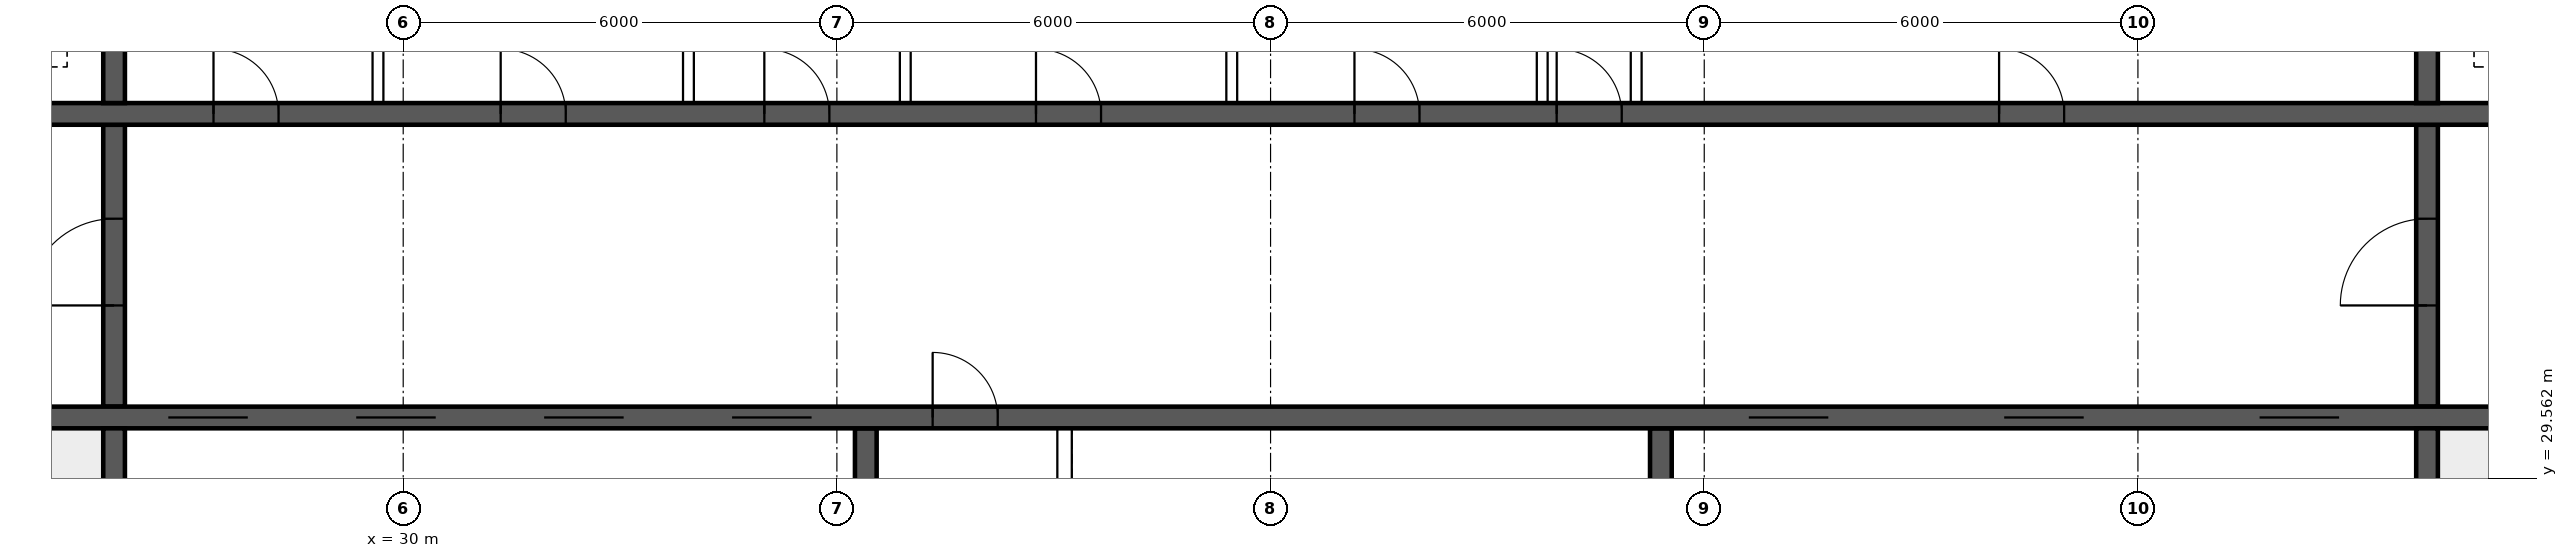
"""IFC4 building model, lengths in metres.
Left out: names, types, materials, properties, quantities, classifications, styles, units other than length and angle.
Written with IfcOpenShell. Run it as: python <this file> out.ifc"""

import sys

from ifc_helpers import new_model, si_unit, direction, frame, frame_2d, origin, place, context, subcontext, project, spatial, rectangle, extrude, element, fill, save


model = new_model("IFC4")
c1 = context("Model", 3, precision=1e-05, world=origin(), true_north=direction((0.0, 1.0)))
c2 = subcontext(c1, "Body", "Model", "MODEL_VIEW")
j1 = project(units=[si_unit("LENGTHUNIT", "METRE"), si_unit("PLANEANGLEUNIT", "RADIAN")], contexts=[c1])
p1 = place(None, origin())
s1 = spatial("IfcSite", under=j1, at=p1, CompositionType="ELEMENT")
p2 = place(p1, origin())
s2 = spatial("IfcBuilding", under=s1, at=p2, CompositionType="ELEMENT")
p3 = place(p2, frame((0.0, 0.0, 84.4)))
s3 = spatial("IfcBuildingStorey", under=s2, at=p3, CompositionType="ELEMENT", Elevation=84.4)
p4 = place(p3, frame((18.475, 30.4, 0.0), z_axis=(0.0, 0.0, 1.0), x_axis=(1.0, 0.0, 0.0)))
e1 = element("IfcWall", 1, at=p4, inside=s3, PredefinedType="SHEAR", context=c2, shape_type="SweptSolid", body=[
    extrude(rectangle(XDim=47.05, YDim=0.3, at=frame_2d((23.525, 0.0))), origin(), (0.0, 0.0, 1.0), 3.75),
])
p5 = place(p4, frame((0.4, 0.0, 0.0)))
e2 = element("IfcOpeningElement", 2, at=p5, cuts=e1, PredefinedType="OPENING", context=c2, shape_type="SweptSolid", body=[
    extrude(rectangle(XDim=1.0, YDim=2.1, at=frame_2d((0.5, 1.05))), frame((0.0, 0.16, 0.0), z_axis=(0.0, -1.0, 0.0), x_axis=(1.0, 0.0, 0.0)), (0.0, 0.0, 1.0), 0.32),
])
p6 = place(p4, frame((45.65, 0.0, 0.0)))
e3 = element("IfcOpeningElement", 3, at=p6, cuts=e1, PredefinedType="OPENING", context=c2, shape_type="SweptSolid", body=[
    extrude(rectangle(XDim=1.0, YDim=2.1, at=frame_2d((0.5, 1.05))), frame((0.0, 0.16, 0.0), z_axis=(0.0, -1.0, 0.0), x_axis=(1.0, 0.0, 0.0)), (0.0, 0.0, 1.0), 0.32),
])
p7 = place(p4, frame((8.275, 0.0, 0.0)))
e4 = element("IfcOpeningElement", 4, at=p7, cuts=e1, PredefinedType="OPENING", context=c2, shape_type="SweptSolid", body=[
    extrude(rectangle(XDim=1.1, YDim=2.1, at=frame_2d((0.55, 1.05))), frame((0.0, 0.16, 0.0), z_axis=(0.0, -1.0, 0.0), x_axis=(1.0, 0.0, 0.0)), (0.0, 0.0, 1.0), 0.32),
])
p8 = place(p4, frame((10.875, 0.0, 0.0)))
e5 = element("IfcOpeningElement", 5, at=p8, cuts=e1, PredefinedType="OPENING", context=c2, shape_type="SweptSolid", body=[
    extrude(rectangle(XDim=1.1, YDim=2.1, at=frame_2d((0.55, 1.05))), frame((0.0, 0.16, 0.0), z_axis=(0.0, -1.0, 0.0), x_axis=(1.0, 0.0, 0.0)), (0.0, 0.0, 1.0), 0.32),
])
p9 = place(p4, frame((13.475, 0.0, 0.0)))
e6 = element("IfcOpeningElement", 6, at=p9, cuts=e1, PredefinedType="OPENING", context=c2, shape_type="SweptSolid", body=[
    extrude(rectangle(XDim=1.1, YDim=2.1, at=frame_2d((0.55, 1.05))), frame((0.0, 0.16, 0.0), z_axis=(0.0, -1.0, 0.0), x_axis=(1.0, 0.0, 0.0)), (0.0, 0.0, 1.0), 0.32),
])
p10 = place(p4, frame((16.075, 0.0, 0.0)))
e7 = element("IfcOpeningElement", 7, at=p10, cuts=e1, PredefinedType="OPENING", context=c2, shape_type="SweptSolid", body=[
    extrude(rectangle(XDim=1.1, YDim=2.1, at=frame_2d((0.55, 1.05))), frame((0.0, 0.16, 0.0), z_axis=(0.0, -1.0, 0.0), x_axis=(1.0, 0.0, 0.0)), (0.0, 0.0, 1.0), 0.32),
])
p11 = place(p4, frame((18.85, 0.0, 0.0)))
e8 = element("IfcOpeningElement", 8, at=p11, cuts=e1, PredefinedType="OPENING", context=c2, shape_type="SweptSolid", body=[
    extrude(rectangle(XDim=0.9, YDim=2.1, at=frame_2d((0.45, 1.05))), frame((0.0, 0.16, 0.0), z_axis=(0.0, -1.0, 0.0), x_axis=(1.0, 0.0, 0.0)), (0.0, 0.0, 1.0), 0.32),
])
p12 = place(p4, frame((30.142, 0.0, 0.0)))
e9 = element("IfcOpeningElement", 9, at=p12, cuts=e1, PredefinedType="OPENING", context=c2, shape_type="SweptSolid", body=[
    extrude(rectangle(XDim=1.1, YDim=2.1, at=frame_2d((0.55, 1.05))), frame((0.0, 0.16, 0.0), z_axis=(0.0, -1.0, 0.0), x_axis=(1.0, 0.0, 0.0)), (0.0, 0.0, 1.0), 0.32),
])
p13 = place(p4, frame((33.675, 0.0, 0.0)))
e10 = element("IfcOpeningElement", 10, at=p13, cuts=e1, PredefinedType="OPENING", context=c2, shape_type="SweptSolid", body=[
    extrude(rectangle(XDim=1.1, YDim=2.1, at=frame_2d((0.55, 1.05))), frame((0.0, 0.16, 0.0), z_axis=(0.0, -1.0, 0.0), x_axis=(1.0, 0.0, 0.0)), (0.0, 0.0, 1.0), 0.32),
])
p14 = place(p4, frame((37.208, 0.0, 0.0)))
e11 = element("IfcOpeningElement", 11, at=p14, cuts=e1, PredefinedType="OPENING", context=c2, shape_type="SweptSolid", body=[
    extrude(rectangle(XDim=1.1, YDim=2.1, at=frame_2d((0.55, 1.05))), frame((0.0, 0.16, 0.0), z_axis=(0.0, -1.0, 0.0), x_axis=(1.0, 0.0, 0.0)), (0.0, 0.0, 1.0), 0.32),
])
p15 = place(p3, frame((18.475, 34.6, 0.0), z_axis=(0.0, 0.0, 1.0), x_axis=(1.0, 0.0, 0.0)))
e12 = element("IfcWall", 12, at=p15, inside=s3, PredefinedType="SHEAR", context=c2, shape_type="SweptSolid", body=[
    extrude(rectangle(XDim=47.05, YDim=0.3, at=frame_2d((23.525, 0.0))), origin(), (0.0, 0.0, 1.0), 3.75),
])
p16 = place(p15, frame((0.9, 0.0, 0.0)))
e13 = element("IfcOpeningElement", 13, at=p16, cuts=e12, PredefinedType="OPENING", context=c2, shape_type="SweptSolid", body=[
    extrude(rectangle(XDim=1.1, YDim=2.1, at=frame_2d((0.55, 1.05))), frame((0.0, 0.16, 0.0), z_axis=(0.0, -1.0, 0.0), x_axis=(1.0, 0.0, 0.0)), (0.0, 0.0, 1.0), 0.32),
])
p17 = place(p15, frame((45.05, 0.0, 0.0)))
e14 = element("IfcOpeningElement", 14, at=p17, cuts=e12, PredefinedType="OPENING", context=c2, shape_type="SweptSolid", body=[
    extrude(rectangle(XDim=1.1, YDim=2.1, at=frame_2d((0.55, 1.05))), frame((0.0, 0.16, 0.0), z_axis=(0.0, -1.0, 0.0), x_axis=(1.0, 0.0, 0.0)), (0.0, 0.0, 1.0), 0.32),
])
p18 = place(p15, frame((4.125, 0.0, 0.0)))
e15 = element("IfcOpeningElement", 15, at=p18, cuts=e12, PredefinedType="OPENING", context=c2, shape_type="SweptSolid", body=[
    extrude(rectangle(XDim=0.9, YDim=2.1, at=frame_2d((0.45, 1.05))), frame((0.0, 0.16, 0.0), z_axis=(0.0, -1.0, 0.0), x_axis=(1.0, 0.0, 0.0)), (0.0, 0.0, 1.0), 0.32),
])
p19 = place(p15, frame((42.025, 0.0, 0.0)))
e16 = element("IfcOpeningElement", 16, at=p19, cuts=e12, PredefinedType="OPENING", context=c2, shape_type="SweptSolid", body=[
    extrude(rectangle(XDim=0.9, YDim=2.1, at=frame_2d((0.45, 1.05))), frame((0.0, 0.16, 0.0), z_axis=(0.0, -1.0, 0.0), x_axis=(1.0, 0.0, 0.0)), (0.0, 0.0, 1.0), 0.32),
])
p20 = place(p15, frame((8.9, 0.0, 0.0)))
e17 = element("IfcOpeningElement", 17, at=p20, cuts=e12, PredefinedType="OPENING", context=c2, shape_type="SweptSolid", body=[
    extrude(rectangle(XDim=0.9, YDim=2.1, at=frame_2d((0.45, 1.05))), frame((0.0, 0.16, 0.0), z_axis=(0.0, -1.0, 0.0), x_axis=(1.0, 0.0, 0.0)), (0.0, 0.0, 1.0), 0.32),
])
p21 = place(p15, frame((12.874, 0.0, 0.0)))
e18 = element("IfcOpeningElement", 18, at=p21, cuts=e12, PredefinedType="OPENING", context=c2, shape_type="SweptSolid", body=[
    extrude(rectangle(XDim=0.9, YDim=2.1, at=frame_2d((0.45, 1.05))), frame((0.0, 0.16, 0.0), z_axis=(0.0, -1.0, 0.0), x_axis=(1.0, 0.0, 0.0)), (0.0, 0.0, 1.0), 0.32),
])
p22 = place(p15, frame((16.521, 0.0, 0.0)))
e19 = element("IfcOpeningElement", 19, at=p22, cuts=e12, PredefinedType="OPENING", context=c2, shape_type="SweptSolid", body=[
    extrude(rectangle(XDim=0.9, YDim=2.1, at=frame_2d((0.45, 1.05))), frame((0.0, 0.16, 0.0), z_axis=(0.0, -1.0, 0.0), x_axis=(1.0, 0.0, 0.0)), (0.0, 0.0, 1.0), 0.32),
])
p23 = place(p15, frame((20.28, 0.0, 0.0)))
e20 = element("IfcOpeningElement", 20, at=p23, cuts=e12, PredefinedType="OPENING", context=c2, shape_type="SweptSolid", body=[
    extrude(rectangle(XDim=0.9, YDim=2.1, at=frame_2d((0.45, 1.05))), frame((0.0, 0.16, 0.0), z_axis=(0.0, -1.0, 0.0), x_axis=(1.0, 0.0, 0.0)), (0.0, 0.0, 1.0), 0.32),
])
p24 = place(p15, frame((24.686, 0.0, 0.0)))
e21 = element("IfcOpeningElement", 21, at=p24, cuts=e12, PredefinedType="OPENING", context=c2, shape_type="SweptSolid", body=[
    extrude(rectangle(XDim=0.9, YDim=2.1, at=frame_2d((0.45, 1.05))), frame((0.0, 0.16, 0.0), z_axis=(0.0, -1.0, 0.0), x_axis=(1.0, 0.0, 0.0)), (0.0, 0.0, 1.0), 0.32),
])
p25 = place(p15, frame((27.483, 0.0, 0.0)))
e22 = element("IfcOpeningElement", 22, at=p25, cuts=e12, PredefinedType="OPENING", context=c2, shape_type="SweptSolid", body=[
    extrude(rectangle(XDim=0.9, YDim=2.1, at=frame_2d((0.45, 1.05))), frame((0.0, 0.16, 0.0), z_axis=(0.0, -1.0, 0.0), x_axis=(1.0, 0.0, 0.0)), (0.0, 0.0, 1.0), 0.32),
])
p26 = place(p15, frame((33.604, 0.0, 0.0)))
e23 = element("IfcOpeningElement", 23, at=p26, cuts=e12, PredefinedType="OPENING", context=c2, shape_type="SweptSolid", body=[
    extrude(rectangle(XDim=0.9, YDim=2.1, at=frame_2d((0.45, 1.05))), frame((0.0, 0.16, 0.0), z_axis=(0.0, -1.0, 0.0), x_axis=(1.0, 0.0, 0.0)), (0.0, 0.0, 1.0), 0.32),
])
for number, where, z_axis, x_axis in (
    (24, (26.0, 26.275, 0.0), (0.0, 0.0, 1.0), (0.0, 1.0, 0.0)),
    (25, (58.0, 26.275, 0.0), (0.0, 0.0, 1.0), (0.0, 1.0, 0.0)),
):
    element("IfcWall", number, at=place(p3, frame(where, z_axis=z_axis, x_axis=x_axis)), inside=s3, PredefinedType="SHEAR", context=c2, shape_type="SweptSolid", body=[
        extrude(rectangle(XDim=3.975, YDim=0.3, at=frame_2d((1.988, 0.0))), origin(), (0.0, 0.0, 1.0), 3.75),
    ])
p27 = place(p3, frame((26.0, 30.55, 0.0), z_axis=(0.0, 0.0, 1.0), x_axis=(0.0, 1.0, 0.0)))
e26 = element("IfcWall", 26, at=p27, inside=s3, PredefinedType="SHEAR", context=c2, shape_type="SweptSolid", body=[
    extrude(rectangle(XDim=3.9, YDim=0.3, at=frame_2d((1.95, 0.0))), origin(), (0.0, 0.0, 1.0), 3.75),
])
p28 = place(p27, frame((1.4, 0.0, 0.0)))
e27 = element("IfcOpeningElement", 27, at=p28, cuts=e26, PredefinedType="OPENING", context=c2, shape_type="SweptSolid", body=[
    extrude(rectangle(XDim=1.2, YDim=2.1, at=frame_2d((0.6, 1.05))), frame((0.0, 0.16, 0.0), z_axis=(0.0, -1.0, 0.0), x_axis=(1.0, 0.0, 0.0)), (0.0, 0.0, 1.0), 0.32),
])
p29 = place(p3, frame((58.0, 30.55, 0.0), z_axis=(0.0, 0.0, 1.0), x_axis=(0.0, 1.0, 0.0)))
e28 = element("IfcWall", 28, at=p29, inside=s3, PredefinedType="SHEAR", context=c2, shape_type="SweptSolid", body=[
    extrude(rectangle(XDim=3.9, YDim=0.3, at=frame_2d((1.95, 0.0))), origin(), (0.0, 0.0, 1.0), 3.75),
])
p30 = place(p29, frame((1.4, 0.0, 0.0)))
e29 = element("IfcOpeningElement", 29, at=p30, cuts=e28, PredefinedType="OPENING", context=c2, shape_type="SweptSolid", body=[
    extrude(rectangle(XDim=1.2, YDim=2.1, at=frame_2d((0.6, 1.05))), frame((0.0, 0.16, 0.0), z_axis=(0.0, -1.0, 0.0), x_axis=(1.0, 0.0, 0.0)), (0.0, 0.0, 1.0), 0.32),
])
for number, where, z_axis, x_axis in (
    (30, (26.0, 34.75, 0.0), (0.0, 0.0, 1.0), (0.0, 1.0, 0.0)),
    (31, (58.0, 34.75, 0.0), (0.0, 0.0, 1.0), (0.0, 1.0, 0.0)),
):
    element("IfcWall", number, at=place(p3, frame(where, z_axis=z_axis, x_axis=x_axis)), inside=s3, PredefinedType="SHEAR", context=c2, shape_type="SweptSolid", body=[
        extrude(rectangle(XDim=2.975, YDim=0.3, at=frame_2d((1.488, 0.0))), origin(), (0.0, 0.0, 1.0), 3.75),
    ])
for number, where, z_axis, x_axis in (
    (32, (36.4, 26.275, 0.0), (0.0, 0.0, 1.0), (0.0, 1.0, 0.0)),
    (33, (47.4, 26.275, 0.0), (0.0, 0.0, 1.0), (0.0, 1.0, 0.0)),
):
    element("IfcWall", number, at=place(p3, frame(where, z_axis=z_axis, x_axis=x_axis)), inside=s3, PredefinedType="SHEAR", context=c2, shape_type="SweptSolid", body=[
        extrude(rectangle(XDim=3.975, YDim=0.3, at=frame_2d((1.988, 0.0))), origin(), (0.0, 0.0, 1.0), 3.75),
    ])
for number, where, z_axis, x_axis in (
    (34, (29.651, 34.75, 0.0), (0.0, 0.0, 1.0), (0.0, 1.0, 0.0)),
    (35, (33.946, 34.75, 0.0), (0.0, 0.0, 1.0), (0.0, 1.0, 0.0)),
    (36, (36.946, 34.75, 0.0), (0.0, 0.0, 1.0), (0.0, 1.0, 0.0)),
    (37, (41.463, 34.75, 0.0), (0.0, 0.0, 1.0), (0.0, 1.0, 0.0)),
    (38, (45.758, 34.75, 0.0), (0.0, 0.0, 1.0), (0.0, 1.0, 0.0)),
    (39, (47.058, 34.75, 0.0), (0.0, 0.0, 1.0), (0.0, 1.0, 0.0)),
):
    element("IfcWall", number, at=place(p3, frame(where, z_axis=z_axis, x_axis=x_axis)), inside=s3, PredefinedType="SOLIDWALL", context=c2, shape_type="SweptSolid", body=[
        extrude(rectangle(XDim=2.975, YDim=0.15, at=frame_2d((1.488, 0.0))), origin(), (0.0, 0.0, 1.0), 3.5),
    ])
p31 = place(p3, frame((39.15, 26.275, 0.0), z_axis=(0.0, 0.0, 1.0), x_axis=(0.0, 1.0, 0.0)))
e40 = element("IfcWall", 40, at=p31, inside=s3, PredefinedType="SOLIDWALL", context=c2, shape_type="SweptSolid", body=[
    extrude(rectangle(XDim=3.975, YDim=0.2, at=frame_2d((1.988, 0.0))), origin(), (0.0, 0.0, 1.0), 3.5),
])
p32 = place(p28, origin())
e41 = element("IfcDoor", 41, at=p32, inside=s3, OperationType="SINGLE_SWING_LEFT", PredefinedType="DOOR", context=c2, shape_type="SweptSolid", body=[
    extrude(rectangle(XDim=1.2, YDim=2.1, at=frame_2d((0.6, 1.05))), frame((0.0, 0.025, 0.0), z_axis=(0.0, -1.0, 0.0), x_axis=(1.0, 0.0, 0.0)), (0.0, 0.0, 1.0), 0.05),
])
fill(e27, e41)
p33 = place(p30, origin())
e42 = element("IfcDoor", 42, at=p33, inside=s3, OperationType="SINGLE_SWING_LEFT", PredefinedType="DOOR", context=c2, shape_type="SweptSolid", body=[
    extrude(rectangle(XDim=1.2, YDim=2.1, at=frame_2d((0.6, 1.05))), frame((0.0, 0.025, 0.0), z_axis=(0.0, -1.0, 0.0), x_axis=(1.0, 0.0, 0.0)), (0.0, 0.0, 1.0), 0.05),
])
fill(e29, e42)
p34 = place(p20, origin())
e43 = element("IfcDoor", 43, at=p34, inside=s3, OperationType="SINGLE_SWING_LEFT", PredefinedType="DOOR", context=c2, shape_type="SweptSolid", body=[
    extrude(rectangle(XDim=0.9, YDim=2.1, at=frame_2d((0.45, 1.05))), frame((0.0, 0.025, 0.0), z_axis=(0.0, -1.0, 0.0), x_axis=(1.0, 0.0, 0.0)), (0.0, 0.0, 1.0), 0.05),
])
fill(e17, e43)
p35 = place(p21, origin())
e44 = element("IfcDoor", 44, at=p35, inside=s3, OperationType="SINGLE_SWING_LEFT", PredefinedType="DOOR", context=c2, shape_type="SweptSolid", body=[
    extrude(rectangle(XDim=0.9, YDim=2.1, at=frame_2d((0.45, 1.05))), frame((0.0, 0.025, 0.0), z_axis=(0.0, -1.0, 0.0), x_axis=(1.0, 0.0, 0.0)), (0.0, 0.0, 1.0), 0.05),
])
fill(e18, e44)
p36 = place(p22, origin())
e45 = element("IfcDoor", 45, at=p36, inside=s3, OperationType="SINGLE_SWING_LEFT", PredefinedType="DOOR", context=c2, shape_type="SweptSolid", body=[
    extrude(rectangle(XDim=0.9, YDim=2.1, at=frame_2d((0.45, 1.05))), frame((0.0, 0.025, 0.0), z_axis=(0.0, -1.0, 0.0), x_axis=(1.0, 0.0, 0.0)), (0.0, 0.0, 1.0), 0.05),
])
fill(e19, e45)
p37 = place(p23, origin())
e46 = element("IfcDoor", 46, at=p37, inside=s3, OperationType="SINGLE_SWING_LEFT", PredefinedType="DOOR", context=c2, shape_type="SweptSolid", body=[
    extrude(rectangle(XDim=0.9, YDim=2.1, at=frame_2d((0.45, 1.05))), frame((0.0, 0.025, 0.0), z_axis=(0.0, -1.0, 0.0), x_axis=(1.0, 0.0, 0.0)), (0.0, 0.0, 1.0), 0.05),
])
fill(e20, e46)
p38 = place(p24, origin())
e47 = element("IfcDoor", 47, at=p38, inside=s3, OperationType="SINGLE_SWING_LEFT", PredefinedType="DOOR", context=c2, shape_type="SweptSolid", body=[
    extrude(rectangle(XDim=0.9, YDim=2.1, at=frame_2d((0.45, 1.05))), frame((0.0, 0.025, 0.0), z_axis=(0.0, -1.0, 0.0), x_axis=(1.0, 0.0, 0.0)), (0.0, 0.0, 1.0), 0.05),
])
fill(e21, e47)
p39 = place(p25, origin())
e48 = element("IfcDoor", 48, at=p39, inside=s3, OperationType="SINGLE_SWING_LEFT", PredefinedType="DOOR", context=c2, shape_type="SweptSolid", body=[
    extrude(rectangle(XDim=0.9, YDim=2.1, at=frame_2d((0.45, 1.05))), frame((0.0, 0.025, 0.0), z_axis=(0.0, -1.0, 0.0), x_axis=(1.0, 0.0, 0.0)), (0.0, 0.0, 1.0), 0.05),
])
fill(e22, e48)
p40 = place(p26, origin())
e49 = element("IfcDoor", 49, at=p40, inside=s3, OperationType="SINGLE_SWING_LEFT", PredefinedType="DOOR", context=c2, shape_type="SweptSolid", body=[
    extrude(rectangle(XDim=0.9, YDim=2.1, at=frame_2d((0.45, 1.05))), frame((0.0, 0.025, 0.0), z_axis=(0.0, -1.0, 0.0), x_axis=(1.0, 0.0, 0.0)), (0.0, 0.0, 1.0), 0.05),
])
fill(e23, e49)
p41 = place(p7, origin())
e50 = element("IfcDoor", 50, at=p41, inside=s3, OperationType="DOUBLE_DOOR_SLIDING", PredefinedType="DOOR", context=c2, shape_type="SweptSolid", body=[
    extrude(rectangle(XDim=1.1, YDim=2.1, at=frame_2d((0.55, 1.05))), frame((0.0, 0.025, 0.0), z_axis=(0.0, -1.0, 0.0), x_axis=(1.0, 0.0, 0.0)), (0.0, 0.0, 1.0), 0.05),
])
fill(e4, e50)
p42 = place(p8, origin())
e51 = element("IfcDoor", 51, at=p42, inside=s3, OperationType="DOUBLE_DOOR_SLIDING", PredefinedType="DOOR", context=c2, shape_type="SweptSolid", body=[
    extrude(rectangle(XDim=1.1, YDim=2.1, at=frame_2d((0.55, 1.05))), frame((0.0, 0.025, 0.0), z_axis=(0.0, -1.0, 0.0), x_axis=(1.0, 0.0, 0.0)), (0.0, 0.0, 1.0), 0.05),
])
fill(e5, e51)
p43 = place(p9, origin())
e52 = element("IfcDoor", 52, at=p43, inside=s3, OperationType="DOUBLE_DOOR_SLIDING", PredefinedType="DOOR", context=c2, shape_type="SweptSolid", body=[
    extrude(rectangle(XDim=1.1, YDim=2.1, at=frame_2d((0.55, 1.05))), frame((0.0, 0.025, 0.0), z_axis=(0.0, -1.0, 0.0), x_axis=(1.0, 0.0, 0.0)), (0.0, 0.0, 1.0), 0.05),
])
fill(e6, e52)
p44 = place(p10, origin())
e53 = element("IfcDoor", 53, at=p44, inside=s3, OperationType="DOUBLE_DOOR_SLIDING", PredefinedType="DOOR", context=c2, shape_type="SweptSolid", body=[
    extrude(rectangle(XDim=1.1, YDim=2.1, at=frame_2d((0.55, 1.05))), frame((0.0, 0.025, 0.0), z_axis=(0.0, -1.0, 0.0), x_axis=(1.0, 0.0, 0.0)), (0.0, 0.0, 1.0), 0.05),
])
fill(e7, e53)
p45 = place(p11, origin())
e54 = element("IfcDoor", 54, at=p45, inside=s3, OperationType="SINGLE_SWING_LEFT", PredefinedType="DOOR", context=c2, shape_type="SweptSolid", body=[
    extrude(rectangle(XDim=0.9, YDim=2.1, at=frame_2d((0.45, 1.05))), frame((0.0, 0.025, 0.0), z_axis=(0.0, -1.0, 0.0), x_axis=(1.0, 0.0, 0.0)), (0.0, 0.0, 1.0), 0.05),
])
fill(e8, e54)
p46 = place(p12, origin())
e55 = element("IfcDoor", 55, at=p46, inside=s3, OperationType="DOUBLE_DOOR_SLIDING", PredefinedType="DOOR", context=c2, shape_type="SweptSolid", body=[
    extrude(rectangle(XDim=1.1, YDim=2.1, at=frame_2d((0.55, 1.05))), frame((0.0, 0.025, 0.0), z_axis=(0.0, -1.0, 0.0), x_axis=(1.0, 0.0, 0.0)), (0.0, 0.0, 1.0), 0.05),
])
fill(e9, e55)
p47 = place(p13, origin())
e56 = element("IfcDoor", 56, at=p47, inside=s3, OperationType="DOUBLE_DOOR_SLIDING", PredefinedType="DOOR", context=c2, shape_type="SweptSolid", body=[
    extrude(rectangle(XDim=1.1, YDim=2.1, at=frame_2d((0.55, 1.05))), frame((0.0, 0.025, 0.0), z_axis=(0.0, -1.0, 0.0), x_axis=(1.0, 0.0, 0.0)), (0.0, 0.0, 1.0), 0.05),
])
fill(e10, e56)
p48 = place(p14, origin())
e57 = element("IfcDoor", 57, at=p48, inside=s3, OperationType="DOUBLE_DOOR_SLIDING", PredefinedType="DOOR", context=c2, shape_type="SweptSolid", body=[
    extrude(rectangle(XDim=1.1, YDim=2.1, at=frame_2d((0.55, 1.05))), frame((0.0, 0.025, 0.0), z_axis=(0.0, -1.0, 0.0), x_axis=(1.0, 0.0, 0.0)), (0.0, 0.0, 1.0), 0.05),
])
fill(e11, e57)
save(model, sys.argv[1])
